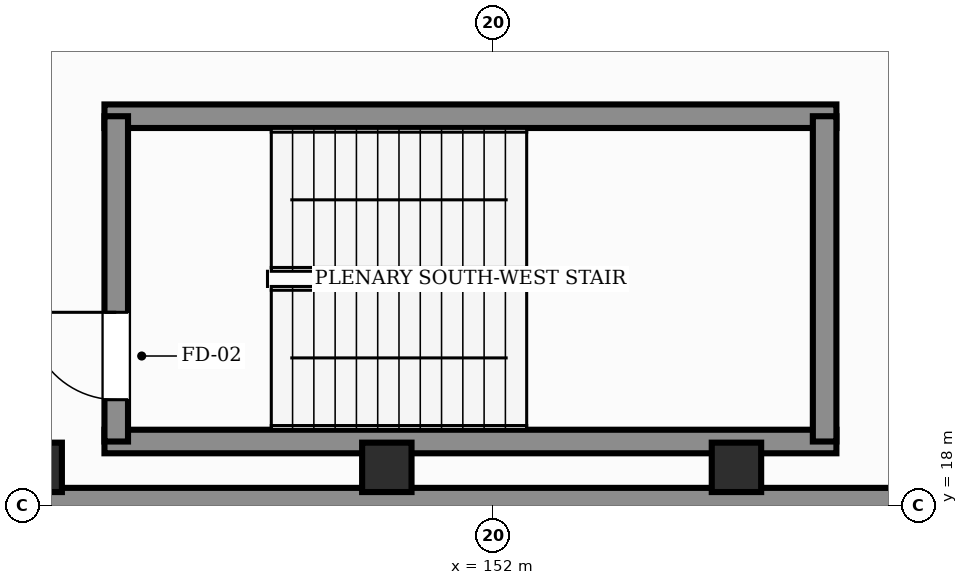
"""IFC4 building model, lengths in metres.
Left out: names, types, materials, properties, quantities, classifications, styles, units other than length and angle.
Written with IfcOpenShell. Run it as: python <this file> out.ifc"""

import sys

from ifc_helpers import new_model, si_unit, direction, frame, frame_2d, origin, origin_2d, place, context, subcontext, project, spatial, rectangle, extrude, element, fill, save


model = new_model("IFC4")
c1 = context("Model", 3, precision=1e-05, world=origin(), true_north=direction((0.0, 1.0)))
c2 = subcontext(c1, "Body", "Model", "MODEL_VIEW")
j1 = project(units=[si_unit("LENGTHUNIT", "METRE"), si_unit("PLANEANGLEUNIT", "RADIAN")], contexts=[c1])
p1 = place(None, origin())
s1 = spatial("IfcSite", under=j1, at=p1, CompositionType="ELEMENT")
p2 = place(p1, origin())
s2 = spatial("IfcBuilding", under=s1, at=p2, CompositionType="ELEMENT")
p3 = place(p2, frame((0.0, 0.0, -4.8)))
s3 = spatial("IfcBuildingStorey", under=s2, at=p3, CompositionType="ELEMENT", Elevation=-4.8)
for number, where, z_axis, x_axis in (
    (1, (146.0, 18.5, 0.0), (0.0, 0.0, 1.0), (1.0, 0.0, 0.0)),
    (2, (150.6, 18.5, 0.0), (0.0, 0.0, 1.0), (1.0, 0.0, 0.0)),
    (3, (155.2, 18.5, 0.0), (0.0, 0.0, 1.0), (1.0, 0.0, 0.0)),
):
    element("IfcColumn", number, at=place(p3, frame(where, z_axis=z_axis, x_axis=x_axis)), inside=s3, PredefinedType="COLUMN", context=c2, shape_type="SweptSolid", body=[
        extrude(rectangle(XDim=0.65, YDim=0.65, at=origin_2d()), origin(), (0.0, 0.0, 1.0), 4.8),
    ])
p4 = place(p3, frame((144.0, 18.0, 0.0), z_axis=(0.0, 0.0, 1.0), x_axis=(1.0, 0.0, 0.0)))
e4 = element("IfcWall", 4, at=p4, inside=s3, PredefinedType="SOLIDWALL", context=c2, shape_type="SweptSolid", body=[
    extrude(rectangle(XDim=36.0, YDim=0.46, at=frame_2d((18.0, 0.0))), origin(), (0.0, 0.0, 1.0), 4.8),
])
for number, where, z_axis, x_axis in (
    (5, (146.885, 18.84, 0.0), (0.0, 0.0, 1.0), (1.0, 0.0, 0.0)),
    (6, (146.885, 23.12, 0.0), (0.0, 0.0, 1.0), (1.0, 0.0, 0.0)),
):
    element("IfcWall", number, at=place(p3, frame(where, z_axis=z_axis, x_axis=x_axis)), inside=s3, PredefinedType="SHEAR", context=c2, shape_type="SweptSolid", body=[
        extrude(rectangle(XDim=9.63, YDim=0.31, at=frame_2d((4.815, 0.0))), origin(), (0.0, 0.0, 1.0), 4.8),
    ])
p5 = place(p3, frame((147.04, 18.84, 0.0), z_axis=(0.0, 0.0, 1.0), x_axis=(0.0, 1.0, 0.0)))
e7 = element("IfcWall", 7, at=p5, inside=s3, PredefinedType="SHEAR", context=c2, shape_type="SweptSolid", body=[
    extrude(rectangle(XDim=4.28, YDim=0.31, at=frame_2d((2.14, 0.0))), origin(), (0.0, 0.0, 1.0), 4.8),
])
p6 = place(p5, frame((0.55, 0.0, 0.0)))
e8 = element("IfcOpeningElement", 8, at=p6, cuts=e7, PredefinedType="OPENING", context=c2, shape_type="SweptSolid", body=[
    extrude(rectangle(XDim=1.15, YDim=2.2, at=frame_2d((0.575, 1.1))), frame((0.0, 0.165, 0.0), z_axis=(0.0, -1.0, 0.0), x_axis=(1.0, 0.0, 0.0)), (0.0, 0.0, 1.0), 0.33),
])
p7 = place(p3, frame((156.36, 18.84, 0.0), z_axis=(0.0, 0.0, 1.0), x_axis=(0.0, 1.0, 0.0)))
e9 = element("IfcWall", 9, at=p7, inside=s3, PredefinedType="SHEAR", context=c2, shape_type="SweptSolid", body=[
    extrude(rectangle(XDim=4.28, YDim=0.31, at=frame_2d((2.14, 0.0))), origin(), (0.0, 0.0, 1.0), 4.8),
])
p8 = place(p6, origin())
e10 = element("IfcDoor", 10, at=p8, inside=s3, OperationType="SINGLE_SWING_RIGHT", PredefinedType="DOOR", context=c2, shape_type="SweptSolid", body=[
    extrude(rectangle(XDim=1.15, YDim=2.2, at=frame_2d((0.575, 1.1))), frame((0.0, 0.025, 0.0), z_axis=(0.0, -1.0, 0.0), x_axis=(1.0, 0.0, 0.0)), (0.0, 0.0, 1.0), 0.05),
])
fill(e8, e10)
save(model, sys.argv[1])
